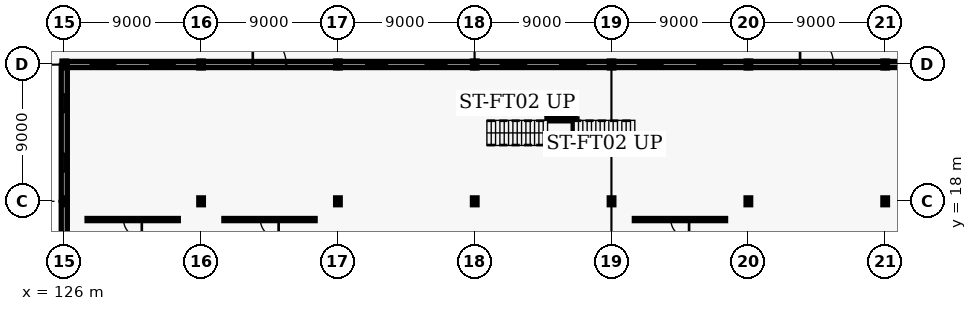
"""IFC4 building model, lengths in metres.
Left out: names, types, materials, properties, quantities, classifications, styles, units other than length and angle.
Written with IfcOpenShell. Run it as: python <this file> out.ifc"""

import sys

from ifc_helpers import new_model, si_unit, direction, frame, frame_2d, origin, origin_2d, place, context, subcontext, project, spatial, rectangle, i_section, extrude, element, fill, save


model = new_model("IFC4")
c1 = context("Model", 3, precision=1e-05, world=origin(), true_north=direction((0.0, 1.0)))
c2 = subcontext(c1, "Body", "Model", "MODEL_VIEW")
j1 = project(units=[si_unit("LENGTHUNIT", "METRE"), si_unit("PLANEANGLEUNIT", "RADIAN")], contexts=[c1])
p1 = place(None, origin())
s1 = spatial("IfcSite", under=j1, at=p1, CompositionType="ELEMENT")
p2 = place(p1, origin())
s2 = spatial("IfcBuilding", under=s1, at=p2, CompositionType="ELEMENT")
p3 = place(p2, origin())
s3 = spatial("IfcBuildingStorey", under=s2, at=p3, CompositionType="ELEMENT", Elevation=0.0)
for number, where, z_axis, x_axis in (
    (1, (126.0, 18.0, 0.0), (0.0, 0.0, 1.0), (1.0, 0.0, 0.0)),
    (2, (126.0, 27.0, 0.0), (0.0, 0.0, 1.0), (1.0, 0.0, 0.0)),
    (3, (135.0, 18.0, 0.0), (0.0, 0.0, 1.0), (1.0, 0.0, 0.0)),
    (4, (135.0, 27.0, 0.0), (0.0, 0.0, 1.0), (1.0, 0.0, 0.0)),
    (5, (144.0, 18.0, 0.0), (0.0, 0.0, 1.0), (1.0, 0.0, 0.0)),
    (6, (144.0, 27.0, 0.0), (0.0, 0.0, 1.0), (1.0, 0.0, 0.0)),
    (7, (153.0, 18.0, 0.0), (0.0, 0.0, 1.0), (1.0, 0.0, 0.0)),
    (8, (153.0, 27.0, 0.0), (0.0, 0.0, 1.0), (1.0, 0.0, 0.0)),
    (9, (162.0, 18.0, 0.0), (0.0, 0.0, 1.0), (1.0, 0.0, 0.0)),
    (10, (162.0, 27.0, 0.0), (0.0, 0.0, 1.0), (1.0, 0.0, 0.0)),
    (11, (171.0, 18.0, 0.0), (0.0, 0.0, 1.0), (1.0, 0.0, 0.0)),
    (12, (171.0, 27.0, 0.0), (0.0, 0.0, 1.0), (1.0, 0.0, 0.0)),
    (13, (180.0, 18.0, 0.0), (0.0, 0.0, 1.0), (1.0, 0.0, 0.0)),
    (14, (180.0, 27.0, 0.0), (0.0, 0.0, 1.0), (1.0, 0.0, 0.0)),
):
    element("IfcColumn", number, at=place(p3, frame(where, z_axis=z_axis, x_axis=x_axis)), inside=s3, PredefinedType="COLUMN", context=c2, shape_type="SweptSolid", body=[
        extrude(i_section(OverallWidth=0.3, OverallDepth=0.45, WebThickness=0.014, FlangeThickness=0.026, FilletRadius=0.027, at=origin_2d()), origin(), (0.0, 0.0, 1.0), 5.4),
    ])
p4 = place(p3, frame((126.06, 27.0, 0.0), z_axis=(0.0, 0.0, 1.0), x_axis=(1.0, 0.0, 0.0)))
e15 = element("IfcWall", 15, at=p4, inside=s3, PredefinedType="SOLIDWALL", context=c2, shape_type="SweptSolid", body=[
    extrude(rectangle(XDim=8.88, YDim=0.4, at=frame_2d((4.44, 0.0))), origin(), (0.0, 0.0, 1.0), 4.7),
])
p5 = place(p4, frame((1.686, 0.0, 0.9)))
e16 = element("IfcOpeningElement", 16, at=p5, cuts=e15, PredefinedType="OPENING", context=c2, shape_type="SweptSolid", body=[
    extrude(rectangle(XDim=1.6, YDim=2.4, at=frame_2d((0.8, 1.2))), frame((0.0, 0.21, 0.0), z_axis=(0.0, -1.0, 0.0), x_axis=(1.0, 0.0, 0.0)), (0.0, 0.0, 1.0), 0.42),
])
p6 = place(p4, frame((5.594, 0.0, 0.9)))
e17 = element("IfcOpeningElement", 17, at=p6, cuts=e15, PredefinedType="OPENING", context=c2, shape_type="SweptSolid", body=[
    extrude(rectangle(XDim=1.6, YDim=2.4, at=frame_2d((0.8, 1.2))), frame((0.0, 0.21, 0.0), z_axis=(0.0, -1.0, 0.0), x_axis=(1.0, 0.0, 0.0)), (0.0, 0.0, 1.0), 0.42),
])
p7 = place(p3, frame((135.06, 27.0, 0.0), z_axis=(0.0, 0.0, 1.0), x_axis=(1.0, 0.0, 0.0)))
e18 = element("IfcWall", 18, at=p7, inside=s3, PredefinedType="SOLIDWALL", context=c2, shape_type="SweptSolid", body=[
    extrude(rectangle(XDim=8.88, YDim=0.4, at=frame_2d((4.44, 0.0))), origin(), (0.0, 0.0, 1.0), 4.7),
])
p8 = place(p7, frame((3.34, 0.0, 0.0)))
e19 = element("IfcOpeningElement", 19, at=p8, cuts=e18, PredefinedType="OPENING", context=c2, shape_type="SweptSolid", body=[
    extrude(rectangle(XDim=2.2, YDim=2.4, at=frame_2d((1.1, 1.2))), frame((0.0, 0.21, 0.0), z_axis=(0.0, -1.0, 0.0), x_axis=(1.0, 0.0, 0.0)), (0.0, 0.0, 1.0), 0.42),
])
p9 = place(p3, frame((144.06, 27.0, 0.0), z_axis=(0.0, 0.0, 1.0), x_axis=(1.0, 0.0, 0.0)))
e20 = element("IfcWall", 20, at=p9, inside=s3, PredefinedType="SOLIDWALL", context=c2, shape_type="SweptSolid", body=[
    extrude(rectangle(XDim=8.88, YDim=0.4, at=frame_2d((4.44, 0.0))), origin(), (0.0, 0.0, 1.0), 4.7),
])
p10 = place(p9, frame((1.811, 0.0, 0.9)))
e21 = element("IfcOpeningElement", 21, at=p10, cuts=e20, PredefinedType="OPENING", context=c2, shape_type="SweptSolid", body=[
    extrude(rectangle(XDim=1.35, YDim=2.15, at=frame_2d((0.675, 1.075))), frame((0.0, 0.21, 0.0), z_axis=(0.0, -1.0, 0.0), x_axis=(1.0, 0.0, 0.0)), (0.0, 0.0, 1.0), 0.42),
])
p11 = place(p9, frame((5.719, 0.0, 0.9)))
e22 = element("IfcOpeningElement", 22, at=p11, cuts=e20, PredefinedType="OPENING", context=c2, shape_type="SweptSolid", body=[
    extrude(rectangle(XDim=1.35, YDim=2.15, at=frame_2d((0.675, 1.075))), frame((0.0, 0.21, 0.0), z_axis=(0.0, -1.0, 0.0), x_axis=(1.0, 0.0, 0.0)), (0.0, 0.0, 1.0), 0.42),
])
p12 = place(p3, frame((153.06, 27.0, 0.0), z_axis=(0.0, 0.0, 1.0), x_axis=(1.0, 0.0, 0.0)))
e23 = element("IfcWall", 23, at=p12, inside=s3, PredefinedType="SOLIDWALL", context=c2, shape_type="SweptSolid", body=[
    extrude(rectangle(XDim=8.88, YDim=0.4, at=frame_2d((4.44, 0.0))), origin(), (0.0, 0.0, 1.0), 4.7),
])
p13 = place(p12, frame((1.661, 0.0, 0.9)))
e24 = element("IfcOpeningElement", 24, at=p13, cuts=e23, PredefinedType="OPENING", context=c2, shape_type="SweptSolid", body=[
    extrude(rectangle(XDim=1.65, YDim=2.3, at=frame_2d((0.825, 1.15))), frame((0.0, 0.21, 0.0), z_axis=(0.0, -1.0, 0.0), x_axis=(1.0, 0.0, 0.0)), (0.0, 0.0, 1.0), 0.42),
])
p14 = place(p12, frame((5.569, 0.0, 0.9)))
e25 = element("IfcOpeningElement", 25, at=p14, cuts=e23, PredefinedType="OPENING", context=c2, shape_type="SweptSolid", body=[
    extrude(rectangle(XDim=1.65, YDim=2.3, at=frame_2d((0.825, 1.15))), frame((0.0, 0.21, 0.0), z_axis=(0.0, -1.0, 0.0), x_axis=(1.0, 0.0, 0.0)), (0.0, 0.0, 1.0), 0.42),
])
p15 = place(p3, frame((162.06, 27.0, 0.0), z_axis=(0.0, 0.0, 1.0), x_axis=(1.0, 0.0, 0.0)))
e26 = element("IfcWall", 26, at=p15, inside=s3, PredefinedType="SOLIDWALL", context=c2, shape_type="SweptSolid", body=[
    extrude(rectangle(XDim=8.88, YDim=0.4, at=frame_2d((4.44, 0.0))), origin(), (0.0, 0.0, 1.0), 4.7),
])
p16 = place(p15, frame((1.686, 0.0, 0.9)))
e27 = element("IfcOpeningElement", 27, at=p16, cuts=e26, PredefinedType="OPENING", context=c2, shape_type="SweptSolid", body=[
    extrude(rectangle(XDim=1.6, YDim=2.4, at=frame_2d((0.8, 1.2))), frame((0.0, 0.21, 0.0), z_axis=(0.0, -1.0, 0.0), x_axis=(1.0, 0.0, 0.0)), (0.0, 0.0, 1.0), 0.42),
])
p17 = place(p15, frame((5.594, 0.0, 0.9)))
e28 = element("IfcOpeningElement", 28, at=p17, cuts=e26, PredefinedType="OPENING", context=c2, shape_type="SweptSolid", body=[
    extrude(rectangle(XDim=1.6, YDim=2.4, at=frame_2d((0.8, 1.2))), frame((0.0, 0.21, 0.0), z_axis=(0.0, -1.0, 0.0), x_axis=(1.0, 0.0, 0.0)), (0.0, 0.0, 1.0), 0.42),
])
p18 = place(p3, frame((171.06, 27.0, 0.0), z_axis=(0.0, 0.0, 1.0), x_axis=(1.0, 0.0, 0.0)))
e29 = element("IfcWall", 29, at=p18, inside=s3, PredefinedType="SOLIDWALL", context=c2, shape_type="SweptSolid", body=[
    extrude(rectangle(XDim=8.88, YDim=0.4, at=frame_2d((4.44, 0.0))), origin(), (0.0, 0.0, 1.0), 4.7),
])
p19 = place(p18, frame((3.34, 0.0, 0.0)))
e30 = element("IfcOpeningElement", 30, at=p19, cuts=e29, PredefinedType="OPENING", context=c2, shape_type="SweptSolid", body=[
    extrude(rectangle(XDim=2.2, YDim=2.4, at=frame_2d((1.1, 1.2))), frame((0.0, 0.21, 0.0), z_axis=(0.0, -1.0, 0.0), x_axis=(1.0, 0.0, 0.0)), (0.0, 0.0, 1.0), 0.42),
])
p20 = place(p3, frame((180.06, 27.0, 0.0), z_axis=(0.0, 0.0, 1.0), x_axis=(1.0, 0.0, 0.0)))
e31 = element("IfcWall", 31, at=p20, inside=s3, PredefinedType="SOLIDWALL", context=c2, shape_type="SweptSolid", body=[
    extrude(rectangle(XDim=8.88, YDim=0.4, at=frame_2d((4.44, 0.0))), origin(), (0.0, 0.0, 1.0), 4.7),
])
p21 = place(p20, frame((1.811, 0.0, 0.9)))
e32 = element("IfcOpeningElement", 32, at=p21, cuts=e31, PredefinedType="OPENING", context=c2, shape_type="SweptSolid", body=[
    extrude(rectangle(XDim=1.35, YDim=2.15, at=frame_2d((0.675, 1.075))), frame((0.0, 0.21, 0.0), z_axis=(0.0, -1.0, 0.0), x_axis=(1.0, 0.0, 0.0)), (0.0, 0.0, 1.0), 0.42),
])
p22 = place(p20, frame((5.719, 0.0, 0.9)))
e33 = element("IfcOpeningElement", 33, at=p22, cuts=e31, PredefinedType="OPENING", context=c2, shape_type="SweptSolid", body=[
    extrude(rectangle(XDim=1.35, YDim=2.15, at=frame_2d((0.675, 1.075))), frame((0.0, 0.21, 0.0), z_axis=(0.0, -1.0, 0.0), x_axis=(1.0, 0.0, 0.0)), (0.0, 0.0, 1.0), 0.42),
])
p23 = place(p3, frame((126.0, 9.06, 0.0), z_axis=(0.0, 0.0, 1.0), x_axis=(0.0, 1.0, 0.0)))
e34 = element("IfcWall", 34, at=p23, inside=s3, PredefinedType="SOLIDWALL", context=c2, shape_type="SweptSolid", body=[
    extrude(rectangle(XDim=8.88, YDim=0.4, at=frame_2d((4.44, 0.0))), origin(), (0.0, 0.0, 1.0), 4.7),
])
p24 = place(p23, frame((3.54, 0.0, 0.0)))
e35 = element("IfcOpeningElement", 35, at=p24, cuts=e34, PredefinedType="OPENING", context=c2, shape_type="SweptSolid", body=[
    extrude(rectangle(XDim=1.8, YDim=2.2, at=frame_2d((0.9, 1.1))), frame((0.0, 0.21, 0.0), z_axis=(0.0, -1.0, 0.0), x_axis=(1.0, 0.0, 0.0)), (0.0, 0.0, 1.0), 0.42),
])
p25 = place(p3, frame((126.0, 18.06, 0.0), z_axis=(0.0, 0.0, 1.0), x_axis=(0.0, 1.0, 0.0)))
e36 = element("IfcWall", 36, at=p25, inside=s3, PredefinedType="SOLIDWALL", context=c2, shape_type="SweptSolid", body=[
    extrude(rectangle(XDim=8.88, YDim=0.4, at=frame_2d((4.44, 0.0))), origin(), (0.0, 0.0, 1.0), 4.7),
])
p26 = place(p25, frame((1.911, 0.0, 0.9)))
e37 = element("IfcOpeningElement", 37, at=p26, cuts=e36, PredefinedType="OPENING", context=c2, shape_type="SweptSolid", body=[
    extrude(rectangle(XDim=1.15, YDim=1.75, at=frame_2d((0.575, 0.875))), frame((0.0, 0.21, 0.0), z_axis=(0.0, -1.0, 0.0), x_axis=(1.0, 0.0, 0.0)), (0.0, 0.0, 1.0), 0.42),
])
p27 = place(p25, frame((5.819, 0.0, 0.9)))
e38 = element("IfcOpeningElement", 38, at=p27, cuts=e36, PredefinedType="OPENING", context=c2, shape_type="SweptSolid", body=[
    extrude(rectangle(XDim=1.15, YDim=1.75, at=frame_2d((0.575, 0.875))), frame((0.0, 0.21, 0.0), z_axis=(0.0, -1.0, 0.0), x_axis=(1.0, 0.0, 0.0)), (0.0, 0.0, 1.0), 0.42),
])
for number, where, z_axis, x_axis in (
    (39, (157.75, 21.58, 0.0), (0.0, 0.0, 1.0), (1.0, 0.0, 0.0)),
    (40, (157.75, 23.42, 0.0), (0.0, 0.0, 1.0), (1.0, 0.0, 0.0)),
):
    element("IfcWall", number, at=place(p3, frame(where, z_axis=z_axis, x_axis=x_axis)), inside=s3, PredefinedType="SHEAR", context=c2, shape_type="SweptSolid", body=[
        extrude(rectangle(XDim=1.85, YDim=0.25, at=frame_2d((0.925, 0.0))), origin(), (0.0, 0.0, 1.0), 2.46),
    ])
p28 = place(p3, frame((159.6, 21.58, 0.0), z_axis=(0.0, 0.0, 1.0), x_axis=(0.0, 1.0, 0.0)))
e41 = element("IfcWall", 41, at=p28, inside=s3, PredefinedType="SHEAR", context=c2, shape_type="SweptSolid", body=[
    extrude(rectangle(XDim=1.84, YDim=0.25, at=frame_2d((0.92, 0.0))), origin(), (0.0, 0.0, 1.0), 2.46),
])
p29 = place(p3, frame((127.5, 16.8, 0.0), z_axis=(0.0, 0.0, 1.0), x_axis=(1.0, 0.0, 0.0)))
e42 = element("IfcWall", 42, at=p29, inside=s3, PredefinedType="PARTITIONING", context=c2, shape_type="SweptSolid", body=[
    extrude(rectangle(XDim=6.0, YDim=0.14, at=frame_2d((3.0, 0.0))), origin(), (0.0, 0.0, 1.0), 4.3),
])
p30 = place(p29, frame((2.4, 0.0, 0.0)))
e43 = element("IfcOpeningElement", 43, at=p30, cuts=e42, PredefinedType="OPENING", context=c2, shape_type="SweptSolid", body=[
    extrude(rectangle(XDim=1.2, YDim=2.2, at=frame_2d((0.6, 1.1))), frame((0.0, 0.08, 0.0), z_axis=(0.0, -1.0, 0.0), x_axis=(1.0, 0.0, 0.0)), (0.0, 0.0, 1.0), 0.16),
])
p31 = place(p3, frame((136.5, 16.8, 0.0), z_axis=(0.0, 0.0, 1.0), x_axis=(1.0, 0.0, 0.0)))
e44 = element("IfcWall", 44, at=p31, inside=s3, PredefinedType="PARTITIONING", context=c2, shape_type="SweptSolid", body=[
    extrude(rectangle(XDim=6.0, YDim=0.14, at=frame_2d((3.0, 0.0))), origin(), (0.0, 0.0, 1.0), 4.3),
])
p32 = place(p31, frame((2.4, 0.0, 0.0)))
e45 = element("IfcOpeningElement", 45, at=p32, cuts=e44, PredefinedType="OPENING", context=c2, shape_type="SweptSolid", body=[
    extrude(rectangle(XDim=1.2, YDim=2.2, at=frame_2d((0.6, 1.1))), frame((0.0, 0.08, 0.0), z_axis=(0.0, -1.0, 0.0), x_axis=(1.0, 0.0, 0.0)), (0.0, 0.0, 1.0), 0.16),
])
p33 = place(p3, frame((163.5, 16.8, 0.0), z_axis=(0.0, 0.0, 1.0), x_axis=(1.0, 0.0, 0.0)))
e46 = element("IfcWall", 46, at=p33, inside=s3, PredefinedType="PARTITIONING", context=c2, shape_type="SweptSolid", body=[
    extrude(rectangle(XDim=6.0, YDim=0.14, at=frame_2d((3.0, 0.0))), origin(), (0.0, 0.0, 1.0), 4.3),
])
p34 = place(p33, frame((2.4, 0.0, 0.0)))
e47 = element("IfcOpeningElement", 47, at=p34, cuts=e46, PredefinedType="OPENING", context=c2, shape_type="SweptSolid", body=[
    extrude(rectangle(XDim=1.2, YDim=2.2, at=frame_2d((0.6, 1.1))), frame((0.0, 0.08, 0.0), z_axis=(0.0, -1.0, 0.0), x_axis=(1.0, 0.0, 0.0)), (0.0, 0.0, 1.0), 0.16),
])
p35 = place(p5, origin())
e48 = element("IfcWindow", 48, at=p35, inside=s3, PartitioningType="SINGLE_PANEL", PredefinedType="WINDOW", context=c2, shape_type="SweptSolid", body=[
    extrude(rectangle(XDim=1.6, YDim=2.4, at=frame_2d((0.8, 1.2))), frame((0.0, 0.03, 0.0), z_axis=(0.0, -1.0, 0.0), x_axis=(1.0, 0.0, 0.0)), (0.0, 0.0, 1.0), 0.06),
])
fill(e16, e48)
p36 = place(p6, origin())
e49 = element("IfcWindow", 49, at=p36, inside=s3, PartitioningType="SINGLE_PANEL", PredefinedType="WINDOW", context=c2, shape_type="SweptSolid", body=[
    extrude(rectangle(XDim=1.6, YDim=2.4, at=frame_2d((0.8, 1.2))), frame((0.0, 0.03, 0.0), z_axis=(0.0, -1.0, 0.0), x_axis=(1.0, 0.0, 0.0)), (0.0, 0.0, 1.0), 0.06),
])
fill(e17, e49)
p37 = place(p8, origin())
e50 = element("IfcDoor", 50, at=p37, inside=s3, OperationType="DOUBLE_DOOR_SINGLE_SWING", PredefinedType="DOOR", context=c2, shape_type="SweptSolid", body=[
    extrude(rectangle(XDim=2.2, YDim=2.4, at=frame_2d((1.1, 1.2))), frame((0.0, 0.025, 0.0), z_axis=(0.0, -1.0, 0.0), x_axis=(1.0, 0.0, 0.0)), (0.0, 0.0, 1.0), 0.05),
])
fill(e19, e50)
p38 = place(p10, origin())
e51 = element("IfcWindow", 51, at=p38, inside=s3, PartitioningType="SINGLE_PANEL", PredefinedType="WINDOW", context=c2, shape_type="SweptSolid", body=[
    extrude(rectangle(XDim=1.35, YDim=2.15, at=frame_2d((0.675, 1.075))), frame((0.0, 0.03, 0.0), z_axis=(0.0, -1.0, 0.0), x_axis=(1.0, 0.0, 0.0)), (0.0, 0.0, 1.0), 0.06),
])
fill(e21, e51)
p39 = place(p11, origin())
e52 = element("IfcWindow", 52, at=p39, inside=s3, PartitioningType="SINGLE_PANEL", PredefinedType="WINDOW", context=c2, shape_type="SweptSolid", body=[
    extrude(rectangle(XDim=1.35, YDim=2.15, at=frame_2d((0.675, 1.075))), frame((0.0, 0.03, 0.0), z_axis=(0.0, -1.0, 0.0), x_axis=(1.0, 0.0, 0.0)), (0.0, 0.0, 1.0), 0.06),
])
fill(e22, e52)
p40 = place(p13, origin())
e53 = element("IfcWindow", 53, at=p40, inside=s3, PartitioningType="SINGLE_PANEL", PredefinedType="WINDOW", context=c2, shape_type="SweptSolid", body=[
    extrude(rectangle(XDim=1.65, YDim=2.3, at=frame_2d((0.825, 1.15))), frame((0.0, 0.03, 0.0), z_axis=(0.0, -1.0, 0.0), x_axis=(1.0, 0.0, 0.0)), (0.0, 0.0, 1.0), 0.06),
])
fill(e24, e53)
p41 = place(p14, origin())
e54 = element("IfcWindow", 54, at=p41, inside=s3, PartitioningType="SINGLE_PANEL", PredefinedType="WINDOW", context=c2, shape_type="SweptSolid", body=[
    extrude(rectangle(XDim=1.65, YDim=2.3, at=frame_2d((0.825, 1.15))), frame((0.0, 0.03, 0.0), z_axis=(0.0, -1.0, 0.0), x_axis=(1.0, 0.0, 0.0)), (0.0, 0.0, 1.0), 0.06),
])
fill(e25, e54)
p42 = place(p16, origin())
e55 = element("IfcWindow", 55, at=p42, inside=s3, PartitioningType="SINGLE_PANEL", PredefinedType="WINDOW", context=c2, shape_type="SweptSolid", body=[
    extrude(rectangle(XDim=1.6, YDim=2.4, at=frame_2d((0.8, 1.2))), frame((0.0, 0.03, 0.0), z_axis=(0.0, -1.0, 0.0), x_axis=(1.0, 0.0, 0.0)), (0.0, 0.0, 1.0), 0.06),
])
fill(e27, e55)
p43 = place(p17, origin())
e56 = element("IfcWindow", 56, at=p43, inside=s3, PartitioningType="SINGLE_PANEL", PredefinedType="WINDOW", context=c2, shape_type="SweptSolid", body=[
    extrude(rectangle(XDim=1.6, YDim=2.4, at=frame_2d((0.8, 1.2))), frame((0.0, 0.03, 0.0), z_axis=(0.0, -1.0, 0.0), x_axis=(1.0, 0.0, 0.0)), (0.0, 0.0, 1.0), 0.06),
])
fill(e28, e56)
p44 = place(p19, origin())
e57 = element("IfcDoor", 57, at=p44, inside=s3, OperationType="DOUBLE_DOOR_SINGLE_SWING", PredefinedType="DOOR", context=c2, shape_type="SweptSolid", body=[
    extrude(rectangle(XDim=2.2, YDim=2.4, at=frame_2d((1.1, 1.2))), frame((0.0, 0.025, 0.0), z_axis=(0.0, -1.0, 0.0), x_axis=(1.0, 0.0, 0.0)), (0.0, 0.0, 1.0), 0.05),
])
fill(e30, e57)
p45 = place(p26, origin())
e58 = element("IfcWindow", 58, at=p45, inside=s3, PartitioningType="SINGLE_PANEL", PredefinedType="WINDOW", context=c2, shape_type="SweptSolid", body=[
    extrude(rectangle(XDim=1.15, YDim=1.75, at=frame_2d((0.575, 0.875))), frame((0.0, 0.03, 0.0), z_axis=(0.0, -1.0, 0.0), x_axis=(1.0, 0.0, 0.0)), (0.0, 0.0, 1.0), 0.06),
])
fill(e37, e58)
p46 = place(p27, origin())
e59 = element("IfcWindow", 59, at=p46, inside=s3, PartitioningType="SINGLE_PANEL", PredefinedType="WINDOW", context=c2, shape_type="SweptSolid", body=[
    extrude(rectangle(XDim=1.15, YDim=1.75, at=frame_2d((0.575, 0.875))), frame((0.0, 0.03, 0.0), z_axis=(0.0, -1.0, 0.0), x_axis=(1.0, 0.0, 0.0)), (0.0, 0.0, 1.0), 0.06),
])
fill(e38, e59)
p47 = place(p30, origin())
e60 = element("IfcDoor", 60, at=p47, inside=s3, OperationType="SINGLE_SWING_RIGHT", PredefinedType="DOOR", context=c2, shape_type="SweptSolid", body=[
    extrude(rectangle(XDim=1.2, YDim=2.2, at=frame_2d((0.6, 1.1))), frame((0.0, 0.025, 0.0), z_axis=(0.0, -1.0, 0.0), x_axis=(1.0, 0.0, 0.0)), (0.0, 0.0, 1.0), 0.05),
])
fill(e43, e60)
p48 = place(p32, origin())
e61 = element("IfcDoor", 61, at=p48, inside=s3, OperationType="SINGLE_SWING_RIGHT", PredefinedType="DOOR", context=c2, shape_type="SweptSolid", body=[
    extrude(rectangle(XDim=1.2, YDim=2.2, at=frame_2d((0.6, 1.1))), frame((0.0, 0.025, 0.0), z_axis=(0.0, -1.0, 0.0), x_axis=(1.0, 0.0, 0.0)), (0.0, 0.0, 1.0), 0.05),
])
fill(e45, e61)
p49 = place(p34, origin())
e62 = element("IfcDoor", 62, at=p49, inside=s3, OperationType="SINGLE_SWING_RIGHT", PredefinedType="DOOR", context=c2, shape_type="SweptSolid", body=[
    extrude(rectangle(XDim=1.2, YDim=2.2, at=frame_2d((0.6, 1.1))), frame((0.0, 0.025, 0.0), z_axis=(0.0, -1.0, 0.0), x_axis=(1.0, 0.0, 0.0)), (0.0, 0.0, 1.0), 0.05),
])
fill(e47, e62)
save(model, sys.argv[1])
